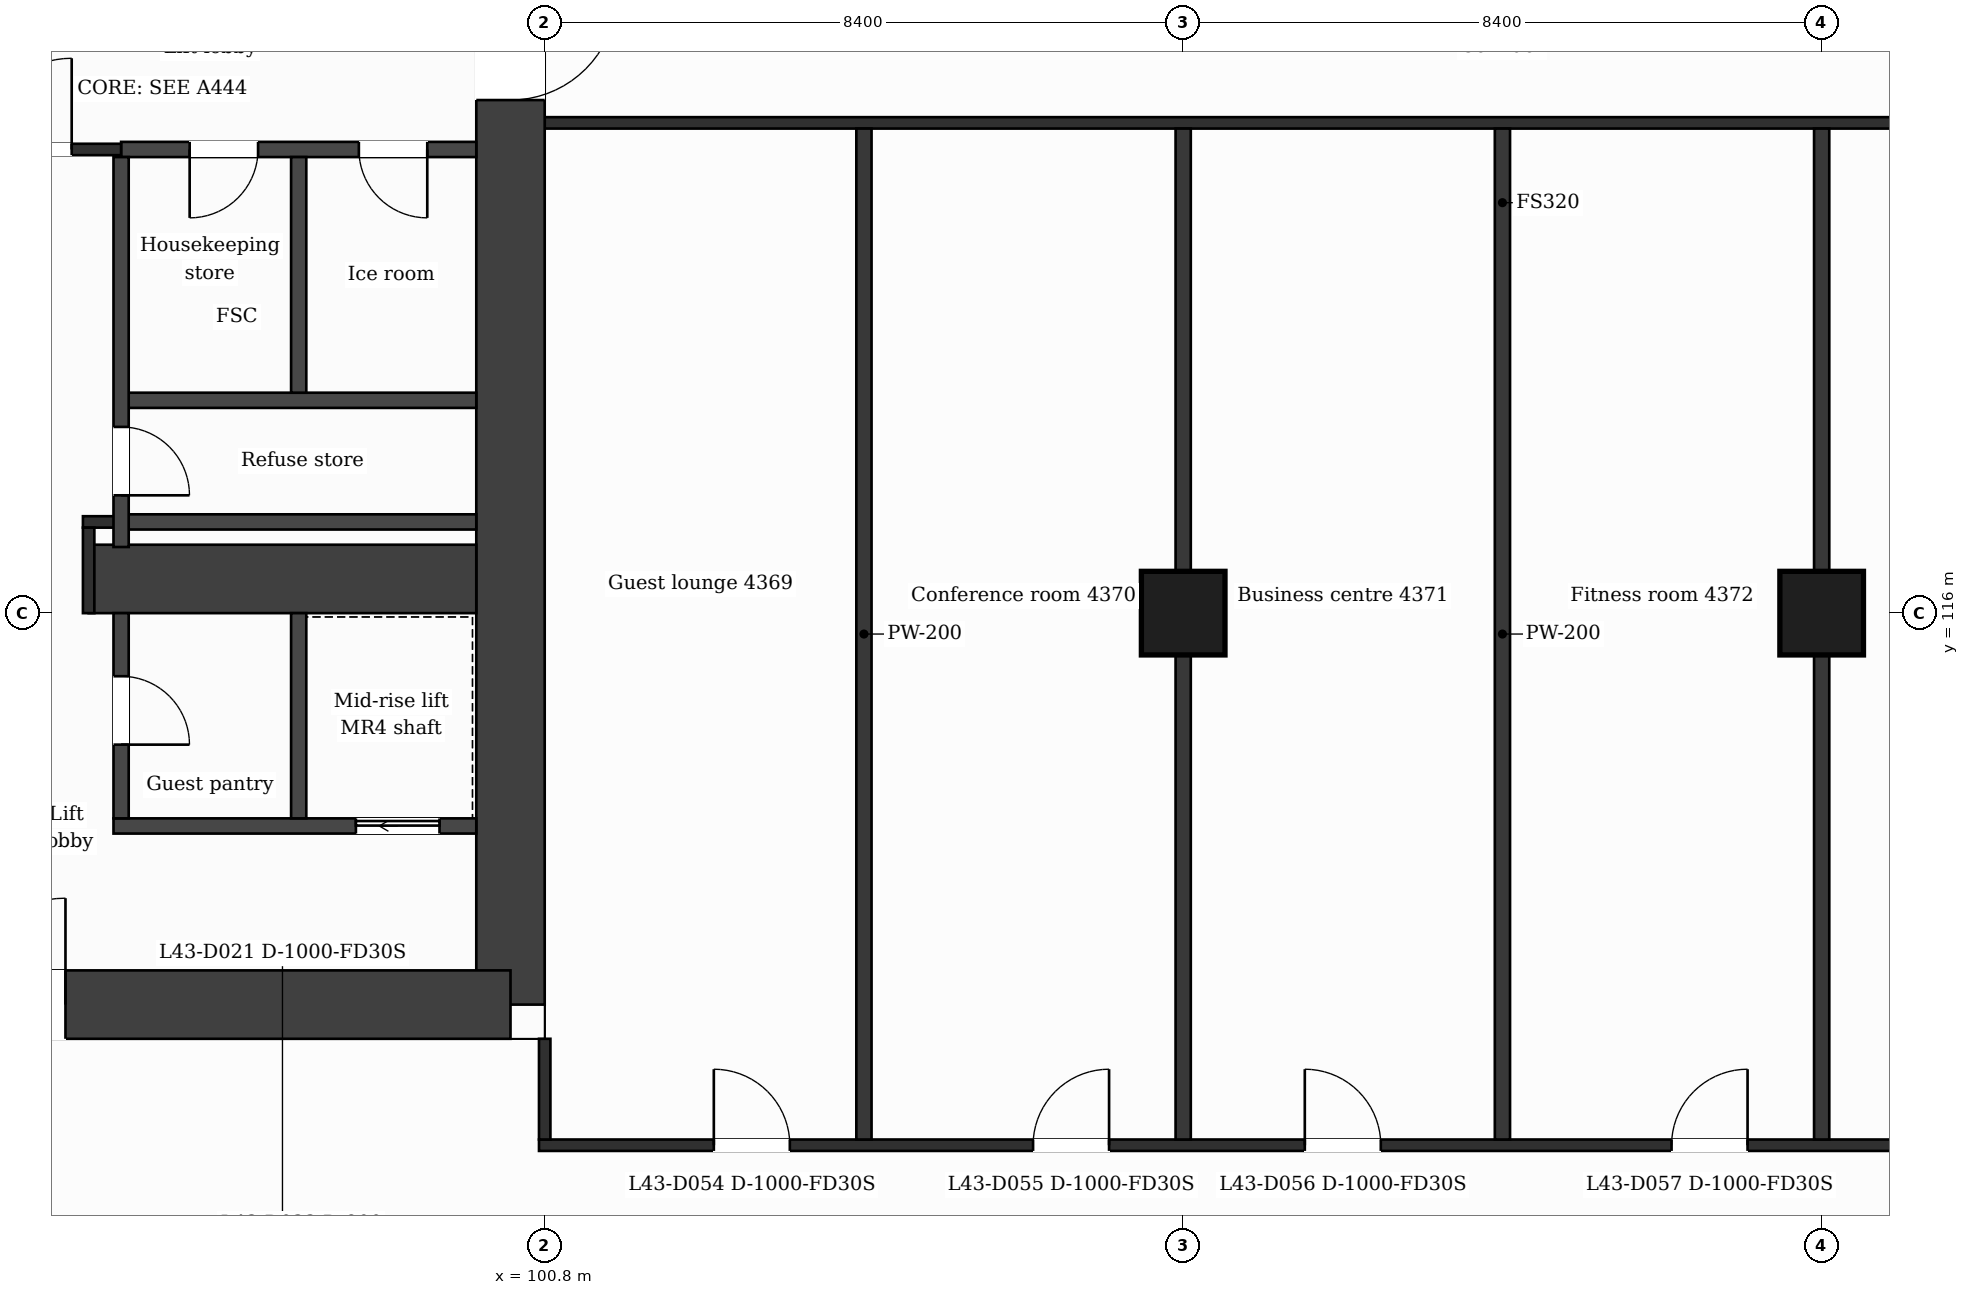
"""IFC4 building model, lengths in metres.
Left out: names, types, materials, properties, quantities, classifications, styles, units other than length and angle.
Written with IfcOpenShell. Run it as: python <this file> out.ifc"""

import sys

from ifc_helpers import new_model, si_unit, direction, frame, frame_2d, origin, origin_2d, place, context, subcontext, project, spatial, rectangle, extrude, element, fill, save


model = new_model("IFC4")
c1 = context("Model", 3, precision=1e-05, world=origin(), true_north=direction((0.0, 1.0)))
c2 = subcontext(c1, "Body", "Model", "MODEL_VIEW")
j1 = project(units=[si_unit("LENGTHUNIT", "METRE"), si_unit("PLANEANGLEUNIT", "RADIAN")], contexts=[c1])
p1 = place(None, origin())
s1 = spatial("IfcSite", under=j1, at=p1, CompositionType="ELEMENT")
p2 = place(p1, origin())
s2 = spatial("IfcBuilding", under=s1, at=p2, CompositionType="ELEMENT")
p3 = place(p2, frame((0.0, 0.0, 181.1)))
s3 = spatial("IfcBuildingStorey", under=s2, at=p3, CompositionType="ELEMENT", Elevation=181.1)
p4 = place(p3, frame((100.35, 131.95, 0.0), z_axis=(0.0, 0.0, 1.0), x_axis=(0.0, -1.0, 0.0)))
e1 = element("IfcWall", 1, at=p4, inside=s3, PredefinedType="SHEAR", context=c2, shape_type="SweptSolid", body=[
    extrude(rectangle(XDim=21.1, YDim=0.9, at=frame_2d((10.55, 0.0))), origin(), (0.0, 0.0, 1.0), 3.7),
])
p5 = place(p4, frame((7.8, 0.0, 0.0)))
e2 = element("IfcOpeningElement", 2, at=p5, cuts=e1, PredefinedType="OPENING", context=c2, shape_type="SweptSolid", body=[
    extrude(rectangle(XDim=1.4, YDim=2.1, at=frame_2d((0.7, 1.05))), frame((0.0, 0.46, 0.0), z_axis=(0.0, -1.0, 0.0), x_axis=(1.0, 0.0, 0.0)), (0.0, 0.0, 1.0), 0.92),
])
p6 = place(p3, frame((100.35, 110.85, 0.0), z_axis=(0.0, 0.0, 1.0), x_axis=(-1.0, 0.0, 0.0)))
e3 = element("IfcWall", 3, at=p6, inside=s3, PredefinedType="SHEAR", context=c2, shape_type="SweptSolid", body=[
    extrude(rectangle(XDim=14.166, YDim=0.9, at=frame_2d((7.083, 0.0))), origin(), (0.0, 0.0, 1.0), 3.7),
])
p7 = place(p6, frame((5.855, 0.0, 0.0)))
e4 = element("IfcOpeningElement", 4, at=p7, cuts=e3, PredefinedType="OPENING", context=c2, shape_type="SweptSolid", body=[
    extrude(rectangle(XDim=1.4, YDim=2.1, at=frame_2d((0.7, 1.05))), frame((0.0, 0.46, 0.0), z_axis=(0.0, -1.0, 0.0), x_axis=(1.0, 0.0, 0.0)), (0.0, 0.0, 1.0), 0.92),
])
p8 = place(p3, frame((94.8, 116.45, 0.0), z_axis=(0.0, 0.0, 1.0), x_axis=(1.0, 0.0, 0.0)))
e5 = element("IfcWall", 5, at=p8, inside=s3, PredefinedType="SHEAR", context=c2, shape_type="SweptSolid", body=[
    extrude(rectangle(XDim=5.1, YDim=0.9, at=frame_2d((2.55, 0.0))), origin(), (0.0, 0.0, 1.0), 3.7),
])
for number, where, z_axis, x_axis in (
    (6, (109.2, 116.0, 0.0), (0.0, 0.0, 1.0), (1.0, 0.0, 0.0)),
    (7, (117.6, 116.0, 0.0), (0.0, 0.0, 1.0), (1.0, 0.0, 0.0)),
):
    element("IfcColumn", number, at=place(p3, frame(where, z_axis=z_axis, x_axis=x_axis)), inside=s3, PredefinedType="COLUMN", context=c2, shape_type="SweptSolid", body=[
        extrude(rectangle(XDim=1.1, YDim=1.1, at=origin_2d()), origin(), (0.0, 0.0, 1.0), 3.7),
    ])
p9 = place(p3, frame((100.725, 109.0, 0.0), z_axis=(0.0, 0.0, 1.0), x_axis=(1.0, 0.0, 0.0)))
e8 = element("IfcWall", 8, at=p9, inside=s3, PredefinedType="PARTITIONING", context=c2, shape_type="SweptSolid", body=[
    extrude(rectangle(XDim=25.35, YDim=0.15, at=frame_2d((12.675, 0.0))), origin(), (0.0, 0.0, 1.0), 3.38),
])
p10 = place(p9, frame((2.3, 0.0, 0.0)))
e9 = element("IfcOpeningElement", 9, at=p10, cuts=e8, PredefinedType="OPENING", context=c2, shape_type="SweptSolid", body=[
    extrude(rectangle(XDim=1.0, YDim=2.1, at=frame_2d((0.5, 1.05))), frame((0.0, 0.085, 0.0), z_axis=(0.0, -1.0, 0.0), x_axis=(1.0, 0.0, 0.0)), (0.0, 0.0, 1.0), 0.17),
])
p11 = place(p9, frame((6.5, 0.0, 0.0)))
e10 = element("IfcOpeningElement", 10, at=p11, cuts=e8, PredefinedType="OPENING", context=c2, shape_type="SweptSolid", body=[
    extrude(rectangle(XDim=1.0, YDim=2.1, at=frame_2d((0.5, 1.05))), frame((0.0, 0.085, 0.0), z_axis=(0.0, -1.0, 0.0), x_axis=(1.0, 0.0, 0.0)), (0.0, 0.0, 1.0), 0.17),
])
p12 = place(p9, frame((10.075, 0.0, 0.0)))
e11 = element("IfcOpeningElement", 11, at=p12, cuts=e8, PredefinedType="OPENING", context=c2, shape_type="SweptSolid", body=[
    extrude(rectangle(XDim=1.0, YDim=2.1, at=frame_2d((0.5, 1.05))), frame((0.0, 0.085, 0.0), z_axis=(0.0, -1.0, 0.0), x_axis=(1.0, 0.0, 0.0)), (0.0, 0.0, 1.0), 0.17),
])
p13 = place(p9, frame((14.9, 0.0, 0.0)))
e12 = element("IfcOpeningElement", 12, at=p13, cuts=e8, PredefinedType="OPENING", context=c2, shape_type="SweptSolid", body=[
    extrude(rectangle(XDim=1.0, YDim=2.1, at=frame_2d((0.5, 1.05))), frame((0.0, 0.085, 0.0), z_axis=(0.0, -1.0, 0.0), x_axis=(1.0, 0.0, 0.0)), (0.0, 0.0, 1.0), 0.17),
])
p14 = place(p9, frame((22.25, 0.0, 0.0)))
e13 = element("IfcOpeningElement", 13, at=p14, cuts=e8, PredefinedType="OPENING", context=c2, shape_type="SweptSolid", body=[
    extrude(rectangle(XDim=1.0, YDim=2.1, at=frame_2d((0.5, 1.05))), frame((0.0, 0.085, 0.0), z_axis=(0.0, -1.0, 0.0), x_axis=(1.0, 0.0, 0.0)), (0.0, 0.0, 1.0), 0.17),
])
p15 = place(p3, frame((95.127, 113.2, 0.0), z_axis=(0.0, 0.0, 1.0), x_axis=(1.0, 0.0, 0.0)))
e14 = element("IfcWall", 14, at=p15, inside=s3, PredefinedType="PARTITIONING", context=c2, shape_type="SweptSolid", body=[
    extrude(rectangle(XDim=4.773, YDim=0.2, at=frame_2d((2.386, 0.0))), origin(), (0.0, 0.0, 1.0), 3.38),
])
p16 = place(p15, frame((3.189, 0.0, 0.0)))
e15 = element("IfcOpeningElement", 15, at=p16, cuts=e14, PredefinedType="OPENING", context=c2, shape_type="SweptSolid", body=[
    extrude(rectangle(XDim=1.1, YDim=2.1, at=frame_2d((0.55, 1.05))), frame((0.0, 0.11, 0.0), z_axis=(0.0, -1.0, 0.0), x_axis=(1.0, 0.0, 0.0)), (0.0, 0.0, 1.0), 0.22),
])
p17 = place(p3, frame((95.227, 117.2, 0.0), z_axis=(0.0, 0.0, 1.0), x_axis=(1.0, 0.0, 0.0)))
e16 = element("IfcWall", 16, at=p17, inside=s3, PredefinedType="PARTITIONING", context=c2, shape_type="SweptSolid", body=[
    extrude(rectangle(XDim=4.673, YDim=0.2, at=frame_2d((2.336, 0.0))), origin(), (0.0, 0.0, 1.0), 3.38),
])
p18 = place(p3, frame((94.725, 117.2, 0.0), z_axis=(0.0, 0.0, 1.0), x_axis=(1.0, 0.0, 0.0)))
e17 = element("IfcWall", 17, at=p18, inside=s3, PredefinedType="PARTITIONING", context=c2, shape_type="SweptSolid", body=[
    extrude(rectangle(XDim=0.502, YDim=0.15, at=frame_2d((0.251, 0.0))), origin(), (0.0, 0.0, 1.0), 3.38),
])
p19 = place(p3, frame((95.227, 118.8, 0.0), z_axis=(0.0, 0.0, 1.0), x_axis=(1.0, 0.0, 0.0)))
e18 = element("IfcWall", 18, at=p19, inside=s3, PredefinedType="PARTITIONING", context=c2, shape_type="SweptSolid", body=[
    extrude(rectangle(XDim=4.673, YDim=0.2, at=frame_2d((2.336, 0.0))), origin(), (0.0, 0.0, 1.0), 3.38),
])
p20 = place(p3, frame((95.227, 122.1, 0.0), z_axis=(0.0, 0.0, 1.0), x_axis=(1.0, 0.0, 0.0)))
e19 = element("IfcWall", 19, at=p20, inside=s3, PredefinedType="PARTITIONING", context=c2, shape_type="SweptSolid", body=[
    extrude(rectangle(XDim=4.673, YDim=0.2, at=frame_2d((2.336, 0.0))), origin(), (0.0, 0.0, 1.0), 3.38),
])
p21 = place(p20, frame((0.902, 0.0, 0.0)))
e20 = element("IfcOpeningElement", 20, at=p21, cuts=e19, PredefinedType="OPENING", context=c2, shape_type="SweptSolid", body=[
    extrude(rectangle(XDim=0.9, YDim=2.1, at=frame_2d((0.45, 1.05))), frame((0.0, 0.11, 0.0), z_axis=(0.0, -1.0, 0.0), x_axis=(1.0, 0.0, 0.0)), (0.0, 0.0, 1.0), 0.22),
])
p22 = place(p20, frame((3.128, 0.0, 0.0)))
e21 = element("IfcOpeningElement", 21, at=p22, cuts=e19, PredefinedType="OPENING", context=c2, shape_type="SweptSolid", body=[
    extrude(rectangle(XDim=0.9, YDim=2.1, at=frame_2d((0.45, 1.05))), frame((0.0, 0.11, 0.0), z_axis=(0.0, -1.0, 0.0), x_axis=(1.0, 0.0, 0.0)), (0.0, 0.0, 1.0), 0.22),
])
p23 = place(p3, frame((92.827, 122.1, 0.0), z_axis=(0.0, 0.0, 1.0), x_axis=(1.0, 0.0, 0.0)))
e22 = element("IfcWall", 22, at=p23, inside=s3, PredefinedType="PARTITIONING", context=c2, shape_type="SweptSolid", body=[
    extrude(rectangle(XDim=2.4, YDim=0.15, at=frame_2d((1.2, 0.0))), origin(), (0.0, 0.0, 1.0), 3.38),
])
p24 = place(p23, frame((0.55, 0.0, 0.0)))
e23 = element("IfcOpeningElement", 23, at=p24, cuts=e22, PredefinedType="OPENING", context=c2, shape_type="SweptSolid", body=[
    extrude(rectangle(XDim=1.2, YDim=2.1, at=frame_2d((0.6, 1.05))), frame((0.0, 0.085, 0.0), z_axis=(0.0, -1.0, 0.0), x_axis=(1.0, 0.0, 0.0)), (0.0, 0.0, 1.0), 0.17),
])
p25 = place(p3, frame((100.8, 122.45, 0.0), z_axis=(0.0, 0.0, 1.0), x_axis=(1.0, 0.0, 0.0)))
e24 = element("IfcWall", 24, at=p25, inside=s3, PredefinedType="PARTITIONING", context=c2, shape_type="SweptSolid", body=[
    extrude(rectangle(XDim=25.2, YDim=0.15, at=frame_2d((12.6, 0.0))), origin(), (0.0, 0.0, 1.0), 3.38),
])
p26 = place(p3, frame((94.8, 116.0, 0.0), z_axis=(0.0, 0.0, 1.0), x_axis=(0.0, 1.0, 0.0)))
e25 = element("IfcWall", 25, at=p26, inside=s3, PredefinedType="PARTITIONING", context=c2, shape_type="SweptSolid", body=[
    extrude(rectangle(XDim=1.125, YDim=0.15, at=frame_2d((0.562, 0.0))), origin(), (0.0, 0.0, 1.0), 3.38),
])
p27 = place(p3, frame((95.227, 113.3, 0.0), z_axis=(0.0, 0.0, 1.0), x_axis=(0.0, 1.0, 0.0)))
e26 = element("IfcWall", 26, at=p27, inside=s3, PredefinedType="PARTITIONING", context=c2, shape_type="SweptSolid", body=[
    extrude(rectangle(XDim=2.7, YDim=0.2, at=frame_2d((1.35, 0.0))), origin(), (0.0, 0.0, 1.0), 3.38),
])
p28 = place(p27, frame((0.97, 0.0, 0.0)))
e27 = element("IfcOpeningElement", 27, at=p28, cuts=e26, PredefinedType="OPENING", context=c2, shape_type="SweptSolid", body=[
    extrude(rectangle(XDim=0.9, YDim=2.1, at=frame_2d((0.45, 1.05))), frame((0.0, 0.11, 0.0), z_axis=(0.0, -1.0, 0.0), x_axis=(1.0, 0.0, 0.0)), (0.0, 0.0, 1.0), 0.22),
])
p29 = place(p3, frame((95.227, 116.87, 0.0), z_axis=(0.0, 0.0, 1.0), x_axis=(0.0, 1.0, 0.0)))
e28 = element("IfcWall", 28, at=p29, inside=s3, PredefinedType="PARTITIONING", context=c2, shape_type="SweptSolid", body=[
    extrude(rectangle(XDim=5.13, YDim=0.2, at=frame_2d((2.565, 0.0))), origin(), (0.0, 0.0, 1.0), 3.38),
])
p30 = place(p29, frame((0.68, 0.0, 0.0)))
e29 = element("IfcOpeningElement", 29, at=p30, cuts=e28, PredefinedType="OPENING", context=c2, shape_type="SweptSolid", body=[
    extrude(rectangle(XDim=0.9, YDim=2.1, at=frame_2d((0.45, 1.05))), frame((0.0, 0.11, 0.0), z_axis=(0.0, -1.0, 0.0), x_axis=(1.0, 0.0, 0.0)), (0.0, 0.0, 1.0), 0.22),
])
p31 = place(p3, frame((97.563, 113.3, 0.0), z_axis=(0.0, 0.0, 1.0), x_axis=(0.0, 1.0, 0.0)))
e30 = element("IfcWall", 30, at=p31, inside=s3, PredefinedType="PARTITIONING", context=c2, shape_type="SweptSolid", body=[
    extrude(rectangle(XDim=2.7, YDim=0.2, at=frame_2d((1.35, 0.0))), origin(), (0.0, 0.0, 1.0), 3.38),
])
p32 = place(p3, frame((97.563, 118.9, 0.0), z_axis=(0.0, 0.0, 1.0), x_axis=(0.0, 1.0, 0.0)))
e31 = element("IfcWall", 31, at=p32, inside=s3, PredefinedType="PARTITIONING", context=c2, shape_type="SweptSolid", body=[
    extrude(rectangle(XDim=3.1, YDim=0.2, at=frame_2d((1.55, 0.0))), origin(), (0.0, 0.0, 1.0), 3.38),
])
p33 = place(p3, frame((100.8, 109.075, 0.0), z_axis=(0.0, 0.0, 1.0), x_axis=(0.0, 1.0, 0.0)))
e32 = element("IfcWall", 32, at=p33, inside=s3, PredefinedType="PARTITIONING", context=c2, shape_type="SweptSolid", body=[
    extrude(rectangle(XDim=1.325, YDim=0.15, at=frame_2d((0.663, 0.0))), origin(), (0.0, 0.0, 1.0), 3.38),
])
for number, where, z_axis, x_axis in (
    (33, (105.0, 109.075, 0.0), (0.0, 0.0, 1.0), (0.0, 1.0, 0.0)),
    (34, (109.2, 109.075, 0.0), (0.0, 0.0, 1.0), (0.0, 1.0, 0.0)),
    (35, (113.4, 109.075, 0.0), (0.0, 0.0, 1.0), (0.0, 1.0, 0.0)),
    (36, (117.6, 109.075, 0.0), (0.0, 0.0, 1.0), (0.0, 1.0, 0.0)),
):
    element("IfcWall", number, at=place(p3, frame(where, z_axis=z_axis, x_axis=x_axis)), inside=s3, PredefinedType="PARTITIONING", context=c2, shape_type="SweptSolid", body=[
        extrude(rectangle(XDim=13.3, YDim=0.2, at=frame_2d((6.65, 0.0))), origin(), (0.0, 0.0, 1.0), 3.38),
    ])
p34 = place(p24, origin())
e37 = element("IfcDoor", 37, at=p34, inside=s3, OperationType="SINGLE_SWING_RIGHT", PredefinedType="DOOR", context=c2, shape_type="SweptSolid", body=[
    extrude(rectangle(XDim=1.2, YDim=2.1, at=frame_2d((0.6, 1.05))), frame((0.0, 0.025, 0.0), z_axis=(0.0, -1.0, 0.0), x_axis=(1.0, 0.0, 0.0)), (0.0, 0.0, 1.0), 0.05),
])
fill(e23, e37)
p35 = place(p21, origin())
e38 = element("IfcDoor", 38, at=p35, inside=s3, OperationType="SINGLE_SWING_LEFT", PredefinedType="DOOR", context=c2, shape_type="SweptSolid", body=[
    extrude(rectangle(XDim=0.9, YDim=2.1, at=frame_2d((0.45, 1.05))), frame((0.0, 0.025, 0.0), z_axis=(0.0, -1.0, 0.0), x_axis=(1.0, 0.0, 0.0)), (0.0, 0.0, 1.0), 0.05),
])
fill(e20, e38)
p36 = place(p22, origin())
e39 = element("IfcDoor", 39, at=p36, inside=s3, OperationType="SINGLE_SWING_RIGHT", PredefinedType="DOOR", context=c2, shape_type="SweptSolid", body=[
    extrude(rectangle(XDim=0.9, YDim=2.1, at=frame_2d((0.45, 1.05))), frame((0.0, 0.025, 0.0), z_axis=(0.0, -1.0, 0.0), x_axis=(1.0, 0.0, 0.0)), (0.0, 0.0, 1.0), 0.05),
])
fill(e21, e39)
p37 = place(p30, origin())
e40 = element("IfcDoor", 40, at=p37, inside=s3, OperationType="SINGLE_SWING_LEFT", PredefinedType="DOOR", context=c2, shape_type="SweptSolid", body=[
    extrude(rectangle(XDim=0.9, YDim=2.1, at=frame_2d((0.45, 1.05))), frame((0.0, 0.025, 0.0), z_axis=(0.0, -1.0, 0.0), x_axis=(1.0, 0.0, 0.0)), (0.0, 0.0, 1.0), 0.05),
])
fill(e29, e40)
p38 = place(p16, origin())
e41 = element("IfcDoor", 41, at=p38, inside=s3, OperationType="SLIDING_TO_LEFT", PredefinedType="DOOR", context=c2, shape_type="SweptSolid", body=[
    extrude(rectangle(XDim=1.1, YDim=2.1, at=frame_2d((0.55, 1.05))), frame((0.0, 0.025, 0.0), z_axis=(0.0, -1.0, 0.0), x_axis=(1.0, 0.0, 0.0)), (0.0, 0.0, 1.0), 0.05),
])
fill(e15, e41)
p39 = place(p28, origin())
e42 = element("IfcDoor", 42, at=p39, inside=s3, OperationType="SINGLE_SWING_LEFT", PredefinedType="DOOR", context=c2, shape_type="SweptSolid", body=[
    extrude(rectangle(XDim=0.9, YDim=2.1, at=frame_2d((0.45, 1.05))), frame((0.0, 0.025, 0.0), z_axis=(0.0, -1.0, 0.0), x_axis=(1.0, 0.0, 0.0)), (0.0, 0.0, 1.0), 0.05),
])
fill(e27, e42)
p40 = place(p10, origin())
e43 = element("IfcDoor", 43, at=p40, inside=s3, OperationType="SINGLE_SWING_LEFT", PredefinedType="DOOR", context=c2, shape_type="SweptSolid", body=[
    extrude(rectangle(XDim=1.0, YDim=2.1, at=frame_2d((0.5, 1.05))), frame((0.0, 0.025, 0.0), z_axis=(0.0, -1.0, 0.0), x_axis=(1.0, 0.0, 0.0)), (0.0, 0.0, 1.0), 0.05),
])
fill(e9, e43)
p41 = place(p11, origin())
e44 = element("IfcDoor", 44, at=p41, inside=s3, OperationType="SINGLE_SWING_RIGHT", PredefinedType="DOOR", context=c2, shape_type="SweptSolid", body=[
    extrude(rectangle(XDim=1.0, YDim=2.1, at=frame_2d((0.5, 1.05))), frame((0.0, 0.025, 0.0), z_axis=(0.0, -1.0, 0.0), x_axis=(1.0, 0.0, 0.0)), (0.0, 0.0, 1.0), 0.05),
])
fill(e10, e44)
p42 = place(p12, origin())
e45 = element("IfcDoor", 45, at=p42, inside=s3, OperationType="SINGLE_SWING_LEFT", PredefinedType="DOOR", context=c2, shape_type="SweptSolid", body=[
    extrude(rectangle(XDim=1.0, YDim=2.1, at=frame_2d((0.5, 1.05))), frame((0.0, 0.025, 0.0), z_axis=(0.0, -1.0, 0.0), x_axis=(1.0, 0.0, 0.0)), (0.0, 0.0, 1.0), 0.05),
])
fill(e11, e45)
p43 = place(p13, origin())
e46 = element("IfcDoor", 46, at=p43, inside=s3, OperationType="SINGLE_SWING_RIGHT", PredefinedType="DOOR", context=c2, shape_type="SweptSolid", body=[
    extrude(rectangle(XDim=1.0, YDim=2.1, at=frame_2d((0.5, 1.05))), frame((0.0, 0.025, 0.0), z_axis=(0.0, -1.0, 0.0), x_axis=(1.0, 0.0, 0.0)), (0.0, 0.0, 1.0), 0.05),
])
fill(e12, e46)
p44 = place(p7, origin())
e47 = element("IfcDoor", 47, at=p44, inside=s3, OperationType="SINGLE_SWING_LEFT", PredefinedType="DOOR", context=c2, shape_type="SweptSolid", body=[
    extrude(rectangle(XDim=1.4, YDim=2.1, at=frame_2d((0.7, 1.05))), frame((0.0, 0.025, 0.0), z_axis=(0.0, -1.0, 0.0), x_axis=(1.0, 0.0, 0.0)), (0.0, 0.0, 1.0), 0.05),
])
fill(e4, e47)
p45 = place(p5, origin())
e48 = element("IfcDoor", 48, at=p45, inside=s3, OperationType="SINGLE_SWING_LEFT", PredefinedType="DOOR", context=c2, shape_type="SweptSolid", body=[
    extrude(rectangle(XDim=1.4, YDim=2.1, at=frame_2d((0.7, 1.05))), frame((0.0, 0.025, 0.0), z_axis=(0.0, -1.0, 0.0), x_axis=(1.0, 0.0, 0.0)), (0.0, 0.0, 1.0), 0.05),
])
fill(e2, e48)
save(model, sys.argv[1])
